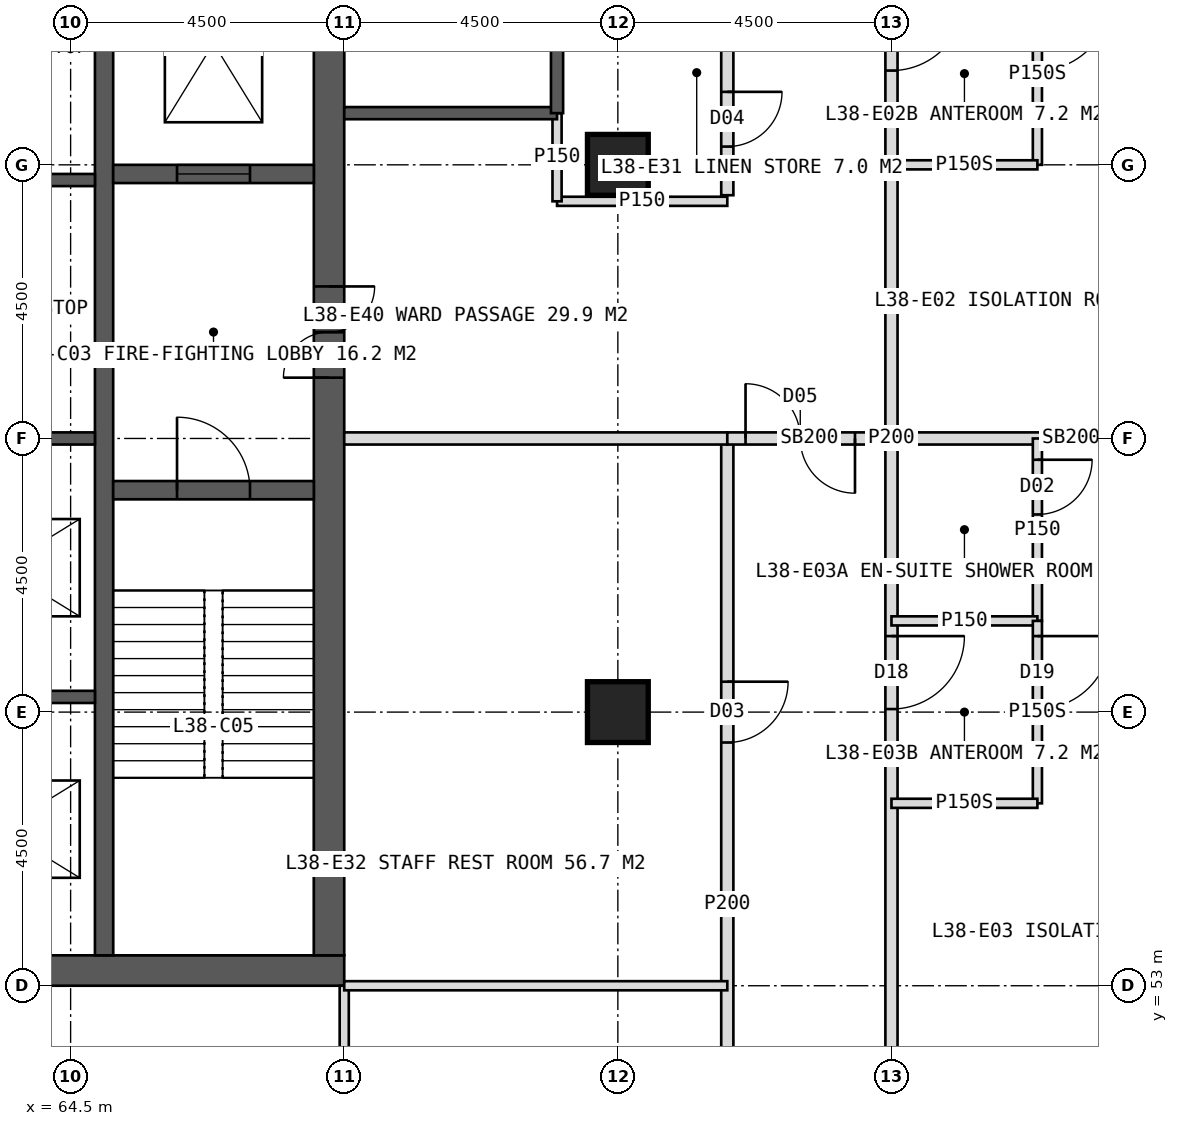
"""IFC4 building model, lengths in metres.
Left out: names, types, materials, properties, quantities, classifications, styles, units other than length and angle.
Written with IfcOpenShell. Run it as: python <this file> out.ifc"""

import sys

from ifc_helpers import new_model, si_unit, direction, frame, frame_2d, origin, origin_2d, place, context, subcontext, project, spatial, rectangle, hollow_rectangle, extrude, element, fill, save


model = new_model("IFC4")
c1 = context("Model", 3, precision=1e-05, world=origin(), true_north=direction((0.0, 1.0)))
c2 = subcontext(c1, "Body", "Model", "MODEL_VIEW")
j1 = project(units=[si_unit("LENGTHUNIT", "METRE"), si_unit("PLANEANGLEUNIT", "RADIAN")], contexts=[c1])
p1 = place(None, origin())
s1 = spatial("IfcSite", under=j1, at=p1, CompositionType="ELEMENT")
p2 = place(p1, origin())
s2 = spatial("IfcBuilding", under=s1, at=p2, CompositionType="ELEMENT")
p3 = place(p2, frame((0.0, 0.0, 160.0)))
s3 = spatial("IfcBuildingStorey", under=s2, at=p3, CompositionType="ELEMENT", Elevation=160.0)
p4 = place(p3, frame((51.0, 53.25, 0.0), z_axis=(0.0, 0.0, 1.0), x_axis=(1.0, 0.0, 0.0)))
e1 = element("IfcWall", 1, at=p4, inside=s3, PredefinedType="SHEAR", context=c2, shape_type="SweptSolid", body=[
    extrude(rectangle(XDim=18.0, YDim=0.5, at=frame_2d((9.0, 0.0))), origin(), (0.0, 0.0, 1.0), 4.0),
])
p5 = place(p4, frame((8.1, 0.0, 0.0)))
e2 = element("IfcOpeningElement", 2, at=p5, cuts=e1, PredefinedType="OPENING", context=c2, shape_type="SweptSolid", body=[
    extrude(rectangle(XDim=1.8, YDim=2.2, at=frame_2d((0.9, 1.1))), frame((0.0, 0.26, 0.0), z_axis=(0.0, -1.0, 0.0), x_axis=(1.0, 0.0, 0.0)), (0.0, 0.0, 1.0), 0.52),
])
p6 = place(p3, frame((68.75, 53.5, 0.0), z_axis=(0.0, 0.0, 1.0), x_axis=(0.0, 1.0, 0.0)))
e3 = element("IfcWall", 3, at=p6, inside=s3, PredefinedType="SHEAR", context=c2, shape_type="SweptSolid", body=[
    extrude(rectangle(XDim=17.0, YDim=0.5, at=frame_2d((8.5, 0.0))), origin(), (0.0, 0.0, 1.0), 4.0),
])
p7 = place(p6, frame((9.5, 0.0, 0.0)))
e4 = element("IfcOpeningElement", 4, at=p7, cuts=e3, PredefinedType="OPENING", context=c2, shape_type="SweptSolid", body=[
    extrude(rectangle(XDim=1.5, YDim=2.2, at=frame_2d((0.75, 1.1))), frame((0.0, 0.26, 0.0), z_axis=(0.0, -1.0, 0.0), x_axis=(1.0, 0.0, 0.0)), (0.0, 0.0, 1.0), 0.52),
])
p8 = place(p3, frame((65.05, 53.5, 0.0), z_axis=(0.0, 0.0, 1.0), x_axis=(0.0, 1.0, 0.0)))
e5 = element("IfcWall", 5, at=p8, inside=s3, PredefinedType="SHEAR", context=c2, shape_type="SweptSolid", body=[
    extrude(rectangle(XDim=17.0, YDim=0.3, at=frame_2d((8.5, 0.0))), origin(), (0.0, 0.0, 1.0), 4.0),
])
for number, where, z_axis, x_axis in (
    (6, (61.85, 57.75, 0.0), (0.0, 0.0, 1.0), (1.0, 0.0, 0.0)),
    (7, (61.85, 62.0, 0.0), (0.0, 0.0, 1.0), (1.0, 0.0, 0.0)),
    (8, (61.85, 66.25, 0.0), (0.0, 0.0, 1.0), (1.0, 0.0, 0.0)),
):
    element("IfcWall", number, at=place(p3, frame(where, z_axis=z_axis, x_axis=x_axis)), inside=s3, PredefinedType="SHEAR", context=c2, shape_type="SweptSolid", body=[
        extrude(rectangle(XDim=3.05, YDim=0.2, at=frame_2d((1.525, 0.0))), origin(), (0.0, 0.0, 1.0), 4.0),
    ])
p9 = place(p3, frame((65.2, 61.15, 0.0), z_axis=(0.0, 0.0, 1.0), x_axis=(1.0, 0.0, 0.0)))
e9 = element("IfcWall", 9, at=p9, inside=s3, PredefinedType="SHEAR", context=c2, shape_type="SweptSolid", body=[
    extrude(rectangle(XDim=3.3, YDim=0.3, at=frame_2d((1.65, 0.0))), origin(), (0.0, 0.0, 1.0), 4.0),
])
p10 = place(p9, frame((1.05, 0.0, 0.0)))
e10 = element("IfcOpeningElement", 10, at=p10, cuts=e9, PredefinedType="OPENING", context=c2, shape_type="SweptSolid", body=[
    extrude(rectangle(XDim=1.2, YDim=2.1, at=frame_2d((0.6, 1.05))), frame((0.0, 0.16, 0.0), z_axis=(0.0, -1.0, 0.0), x_axis=(1.0, 0.0, 0.0)), (0.0, 0.0, 1.0), 0.32),
])
p11 = place(p3, frame((65.2, 66.35, 0.0), z_axis=(0.0, 0.0, 1.0), x_axis=(1.0, 0.0, 0.0)))
e11 = element("IfcWall", 11, at=p11, inside=s3, PredefinedType="SHEAR", context=c2, shape_type="SweptSolid", body=[
    extrude(rectangle(XDim=3.3, YDim=0.3, at=frame_2d((1.65, 0.0))), origin(), (0.0, 0.0, 1.0), 4.0),
])
p12 = place(p11, frame((1.05, 0.0, 0.0)))
e12 = element("IfcOpeningElement", 12, at=p12, cuts=e11, PredefinedType="OPENING", context=c2, shape_type="SweptSolid", body=[
    extrude(rectangle(XDim=1.2, YDim=2.2, at=frame_2d((0.6, 1.1))), frame((0.0, 0.16, 0.0), z_axis=(0.0, -1.0, 0.0), x_axis=(1.0, 0.0, 0.0)), (0.0, 0.0, 1.0), 0.32),
])
for number, where, z_axis, x_axis in (
    (13, (73.5, 57.5, 0.0), (0.0, 0.0, 1.0), (1.0, 0.0, 0.0)),
    (14, (73.5, 66.5, 0.0), (0.0, 0.0, 1.0), (1.0, 0.0, 0.0)),
):
    element("IfcColumn", number, at=place(p3, frame(where, z_axis=z_axis, x_axis=x_axis)), inside=s3, PredefinedType="COLUMN", context=c2, shape_type="SweptSolid", body=[
        extrude(hollow_rectangle(XDim=1.0, YDim=1.0, WallThickness=0.1, at=origin_2d()), origin(), (0.0, 0.0, 1.0), 4.0),
    ])
p13 = place(p3, frame((69.0, 53.0, 0.0), z_axis=(0.0, 0.0, 1.0), x_axis=(0.0, -1.0, 0.0)))
e15 = element("IfcWall", 15, at=p13, inside=s3, PredefinedType="PARTITIONING", context=c2, shape_type="SweptSolid", body=[
    extrude(rectangle(XDim=6.3, YDim=0.15, at=frame_2d((3.15, 0.0))), origin(), (0.0, 0.0, 1.0), 3.75),
])
p14 = place(p3, frame((78.0, 62.0, 0.0), z_axis=(0.0, 0.0, 1.0), x_axis=(1.0, 0.0, 0.0)))
e16 = element("IfcWall", 16, at=p14, inside=s3, PredefinedType="SOLIDWALL", context=c2, shape_type="SweptSolid", body=[
    extrude(rectangle(XDim=5.91, YDim=0.2, at=frame_2d((2.955, 0.0))), origin(), (0.0, 0.0, 1.0), 2.95),
])
p15 = place(p3, frame((78.0, 80.0, 0.0), z_axis=(0.0, 0.0, 1.0), x_axis=(0.0, -1.0, 0.0)))
e17 = element("IfcWall", 17, at=p15, inside=s3, PredefinedType="PARTITIONING", context=c2, shape_type="SweptSolid", body=[
    extrude(rectangle(XDim=36.0, YDim=0.2, at=frame_2d((18.0, 0.0))), origin(), (0.0, 0.0, 1.0), 3.75),
])
p16 = place(p15, frame((3.25, 0.0, 0.0)))
e18 = element("IfcOpeningElement", 18, at=p16, cuts=e17, PredefinedType="OPENING", context=c2, shape_type="SweptSolid", body=[
    extrude(rectangle(XDim=1.2, YDim=2.2, at=frame_2d((0.6, 1.1))), frame((0.0, 0.11, 0.0), z_axis=(0.0, -1.0, 0.0), x_axis=(1.0, 0.0, 0.0)), (0.0, 0.0, 1.0), 0.22),
])
p17 = place(p15, frame((10.75, 0.0, 0.0)))
e19 = element("IfcOpeningElement", 19, at=p17, cuts=e17, PredefinedType="OPENING", context=c2, shape_type="SweptSolid", body=[
    extrude(rectangle(XDim=1.2, YDim=2.2, at=frame_2d((0.6, 1.1))), frame((0.0, 0.11, 0.0), z_axis=(0.0, -1.0, 0.0), x_axis=(1.0, 0.0, 0.0)), (0.0, 0.0, 1.0), 0.22),
])
p18 = place(p15, frame((21.25, 0.0, 0.0)))
e20 = element("IfcOpeningElement", 20, at=p18, cuts=e17, PredefinedType="OPENING", context=c2, shape_type="SweptSolid", body=[
    extrude(rectangle(XDim=1.2, YDim=2.2, at=frame_2d((0.6, 1.1))), frame((0.0, 0.11, 0.0), z_axis=(0.0, -1.0, 0.0), x_axis=(1.0, 0.0, 0.0)), (0.0, 0.0, 1.0), 0.22),
])
p19 = place(p15, frame((31.75, 0.0, 0.0)))
e21 = element("IfcOpeningElement", 21, at=p19, cuts=e17, PredefinedType="OPENING", context=c2, shape_type="SweptSolid", body=[
    extrude(rectangle(XDim=1.2, YDim=2.2, at=frame_2d((0.6, 1.1))), frame((0.0, 0.11, 0.0), z_axis=(0.0, -1.0, 0.0), x_axis=(1.0, 0.0, 0.0)), (0.0, 0.0, 1.0), 0.22),
])
p20 = place(p3, frame((80.4, 69.5, 0.0), z_axis=(0.0, 0.0, 1.0), x_axis=(0.0, -1.0, 0.0)))
e22 = element("IfcWall", 22, at=p20, inside=s3, PredefinedType="PARTITIONING", context=c2, shape_type="SweptSolid", body=[
    extrude(rectangle(XDim=3.0, YDim=0.15, at=frame_2d((1.5, 0.0))), origin(), (0.0, 0.0, 1.0), 3.75),
])
p21 = place(p20, frame((0.25, 0.0, 0.0)))
e23 = element("IfcOpeningElement", 23, at=p21, cuts=e22, PredefinedType="OPENING", context=c2, shape_type="SweptSolid", body=[
    extrude(rectangle(XDim=1.2, YDim=2.2, at=frame_2d((0.6, 1.1))), frame((0.0, 0.085, 0.0), z_axis=(0.0, -1.0, 0.0), x_axis=(1.0, 0.0, 0.0)), (0.0, 0.0, 1.0), 0.17),
])
p22 = place(p3, frame((78.0, 66.5, 0.0), z_axis=(0.0, 0.0, 1.0), x_axis=(1.0, 0.0, 0.0)))
e24 = element("IfcWall", 24, at=p22, inside=s3, PredefinedType="PARTITIONING", context=c2, shape_type="SweptSolid", body=[
    extrude(rectangle(XDim=2.4, YDim=0.15, at=frame_2d((1.2, 0.0))), origin(), (0.0, 0.0, 1.0), 2.95),
])
p23 = place(p3, frame((80.4, 62.0, 0.0), z_axis=(0.0, 0.0, 1.0), x_axis=(0.0, -1.0, 0.0)))
e25 = element("IfcWall", 25, at=p23, inside=s3, PredefinedType="PARTITIONING", context=c2, shape_type="SweptSolid", body=[
    extrude(rectangle(XDim=3.0, YDim=0.15, at=frame_2d((1.5, 0.0))), origin(), (0.0, 0.0, 1.0), 3.75),
])
p24 = place(p23, frame((0.35, 0.0, 0.0)))
e26 = element("IfcOpeningElement", 26, at=p24, cuts=e25, PredefinedType="OPENING", context=c2, shape_type="SweptSolid", body=[
    extrude(rectangle(XDim=0.9, YDim=2.1, at=frame_2d((0.45, 1.05))), frame((0.0, 0.085, 0.0), z_axis=(0.0, -1.0, 0.0), x_axis=(1.0, 0.0, 0.0)), (0.0, 0.0, 1.0), 0.17),
])
p25 = place(p3, frame((78.0, 59.0, 0.0), z_axis=(0.0, 0.0, 1.0), x_axis=(1.0, 0.0, 0.0)))
e27 = element("IfcWall", 27, at=p25, inside=s3, PredefinedType="PARTITIONING", context=c2, shape_type="SweptSolid", body=[
    extrude(rectangle(XDim=2.4, YDim=0.15, at=frame_2d((1.2, 0.0))), origin(), (0.0, 0.0, 1.0), 3.75),
])
p26 = place(p3, frame((80.4, 59.0, 0.0), z_axis=(0.0, 0.0, 1.0), x_axis=(0.0, -1.0, 0.0)))
e28 = element("IfcWall", 28, at=p26, inside=s3, PredefinedType="PARTITIONING", context=c2, shape_type="SweptSolid", body=[
    extrude(rectangle(XDim=3.0, YDim=0.15, at=frame_2d((1.5, 0.0))), origin(), (0.0, 0.0, 1.0), 3.75),
])
p27 = place(p26, frame((0.25, 0.0, 0.0)))
e29 = element("IfcOpeningElement", 29, at=p27, cuts=e28, PredefinedType="OPENING", context=c2, shape_type="SweptSolid", body=[
    extrude(rectangle(XDim=1.2, YDim=2.2, at=frame_2d((0.6, 1.1))), frame((0.0, 0.085, 0.0), z_axis=(0.0, -1.0, 0.0), x_axis=(1.0, 0.0, 0.0)), (0.0, 0.0, 1.0), 0.17),
])
p28 = place(p3, frame((78.0, 56.0, 0.0), z_axis=(0.0, 0.0, 1.0), x_axis=(1.0, 0.0, 0.0)))
e30 = element("IfcWall", 30, at=p28, inside=s3, PredefinedType="PARTITIONING", context=c2, shape_type="SweptSolid", body=[
    extrude(rectangle(XDim=2.4, YDim=0.15, at=frame_2d((1.2, 0.0))), origin(), (0.0, 0.0, 1.0), 3.75),
])
p29 = place(p3, frame((75.3, 77.3, 0.0), z_axis=(0.0, 0.0, 1.0), x_axis=(0.0, -1.0, 0.0)))
e31 = element("IfcWall", 31, at=p29, inside=s3, PredefinedType="PARTITIONING", context=c2, shape_type="SweptSolid", body=[
    extrude(rectangle(XDim=11.3, YDim=0.2, at=frame_2d((5.65, 0.0))), origin(), (0.0, 0.0, 1.0), 3.75),
])
p30 = place(p29, frame((7.1, 0.0, 0.0)))
e32 = element("IfcOpeningElement", 32, at=p30, cuts=e31, PredefinedType="OPENING", context=c2, shape_type="SweptSolid", body=[
    extrude(rectangle(XDim=0.9, YDim=2.1, at=frame_2d((0.45, 1.05))), frame((0.0, 0.11, 0.0), z_axis=(0.0, -1.0, 0.0), x_axis=(1.0, 0.0, 0.0)), (0.0, 0.0, 1.0), 0.22),
])
p31 = place(p29, frame((9.6, 0.0, 0.0)))
e33 = element("IfcOpeningElement", 33, at=p31, cuts=e31, PredefinedType="OPENING", context=c2, shape_type="SweptSolid", body=[
    extrude(rectangle(XDim=0.9, YDim=2.1, at=frame_2d((0.45, 1.05))), frame((0.0, 0.11, 0.0), z_axis=(0.0, -1.0, 0.0), x_axis=(1.0, 0.0, 0.0)), (0.0, 0.0, 1.0), 0.22),
])
p32 = place(p3, frame((75.3, 62.0, 0.0), z_axis=(0.0, 0.0, 1.0), x_axis=(0.0, -1.0, 0.0)))
e34 = element("IfcWall", 34, at=p32, inside=s3, PredefinedType="PARTITIONING", context=c2, shape_type="SweptSolid", body=[
    extrude(rectangle(XDim=15.3, YDim=0.2, at=frame_2d((7.65, 0.0))), origin(), (0.0, 0.0, 1.0), 3.75),
])
p33 = place(p32, frame((4.0, 0.0, 0.0)))
e35 = element("IfcOpeningElement", 35, at=p33, cuts=e34, PredefinedType="OPENING", context=c2, shape_type="SweptSolid", body=[
    extrude(rectangle(XDim=1.0, YDim=2.1, at=frame_2d((0.5, 1.05))), frame((0.0, 0.11, 0.0), z_axis=(0.0, -1.0, 0.0), x_axis=(1.0, 0.0, 0.0)), (0.0, 0.0, 1.0), 0.22),
])
p34 = place(p32, frame((11.65, 0.0, 0.0)))
e36 = element("IfcOpeningElement", 36, at=p34, cuts=e34, PredefinedType="OPENING", context=c2, shape_type="SweptSolid", body=[
    extrude(rectangle(XDim=1.0, YDim=2.1, at=frame_2d((0.5, 1.05))), frame((0.0, 0.11, 0.0), z_axis=(0.0, -1.0, 0.0), x_axis=(1.0, 0.0, 0.0)), (0.0, 0.0, 1.0), 0.22),
])
p35 = place(p3, frame((72.5, 65.9, 0.0), z_axis=(0.0, 0.0, 1.0), x_axis=(1.0, 0.0, 0.0)))
e37 = element("IfcWall", 37, at=p35, inside=s3, PredefinedType="PARTITIONING", context=c2, shape_type="SweptSolid", body=[
    extrude(rectangle(XDim=2.8, YDim=0.15, at=frame_2d((1.4, 0.0))), origin(), (0.0, 0.0, 1.0), 3.75),
])
p36 = place(p3, frame((69.0, 62.0, 0.0), z_axis=(0.0, 0.0, 1.0), x_axis=(1.0, 0.0, 0.0)))
e38 = element("IfcWall", 38, at=p36, inside=s3, PredefinedType="SOLIDWALL", context=c2, shape_type="SweptSolid", body=[
    extrude(rectangle(XDim=6.3, YDim=0.2, at=frame_2d((3.15, 0.0))), origin(), (0.0, 0.0, 1.0), 2.95),
])
p37 = place(p3, frame((69.0, 53.0, 0.0), z_axis=(0.0, 0.0, 1.0), x_axis=(1.0, 0.0, 0.0)))
e39 = element("IfcWall", 39, at=p37, inside=s3, PredefinedType="PARTITIONING", context=c2, shape_type="SweptSolid", body=[
    extrude(rectangle(XDim=6.3, YDim=0.15, at=frame_2d((3.15, 0.0))), origin(), (0.0, 0.0, 1.0), 3.75),
])
p38 = place(p3, frame((75.3, 62.0, 0.0), z_axis=(0.0, 0.0, 1.0), x_axis=(1.0, 0.0, 0.0)))
e40 = element("IfcWall", 40, at=p38, inside=s3, PredefinedType="SOLIDWALL", context=c2, shape_type="SweptSolid", body=[
    extrude(rectangle(XDim=2.7, YDim=0.2, at=frame_2d((1.35, 0.0))), origin(), (0.0, 0.0, 1.0), 2.95),
])
p39 = place(p38, frame((0.3, 0.0, 0.0)))
e41 = element("IfcOpeningElement", 41, at=p39, cuts=e40, PredefinedType="OPENING", context=c2, shape_type="SweptSolid", body=[
    extrude(rectangle(XDim=1.8, YDim=2.2, at=frame_2d((0.9, 1.1))), frame((0.0, 0.11, 0.0), z_axis=(0.0, -1.0, 0.0), x_axis=(1.0, 0.0, 0.0)), (0.0, 0.0, 1.0), 0.22),
])
p40 = place(p3, frame((72.5, 65.9, 0.0), z_axis=(0.0, 0.0, 1.0), x_axis=(0.0, 1.0, 0.0)))
e42 = element("IfcWall", 42, at=p40, inside=s3, PredefinedType="PARTITIONING", context=c2, shape_type="SweptSolid", body=[
    extrude(rectangle(XDim=1.45, YDim=0.15, at=frame_2d((0.725, 0.0))), origin(), (0.0, 0.0, 1.0), 3.75),
])
p41 = place(p3, frame((69.0, 67.35, 0.0), z_axis=(0.0, 0.0, 1.0), x_axis=(1.0, 0.0, 0.0)))
e43 = element("IfcWall", 43, at=p41, inside=s3, PredefinedType="SOLIDWALL", context=c2, shape_type="SweptSolid", body=[
    extrude(rectangle(XDim=3.5, YDim=0.2, at=frame_2d((1.75, 0.0))), origin(), (0.0, 0.0, 1.0), 3.75),
])
p42 = place(p3, frame((72.5, 67.35, 0.0), z_axis=(0.0, 0.0, 1.0), x_axis=(0.0, 1.0, 0.0)))
e44 = element("IfcWall", 44, at=p42, inside=s3, PredefinedType="SOLIDWALL", context=c2, shape_type="SweptSolid", body=[
    extrude(rectangle(XDim=7.75, YDim=0.2, at=frame_2d((3.875, 0.0))), origin(), (0.0, 0.0, 1.0), 3.75),
])
p43 = place(p21, origin())
e45 = element("IfcDoor", 45, at=p43, inside=s3, OperationType="SINGLE_SWING_LEFT", PredefinedType="DOOR", context=c2, shape_type="SweptSolid", body=[
    extrude(rectangle(XDim=1.2, YDim=2.2, at=frame_2d((0.6, 1.1))), frame((0.0, 0.025, 0.0), z_axis=(0.0, -1.0, 0.0), x_axis=(1.0, 0.0, 0.0)), (0.0, 0.0, 1.0), 0.05),
])
fill(e23, e45)
p44 = place(p17, origin())
e46 = element("IfcDoor", 46, at=p44, inside=s3, OperationType="SINGLE_SWING_LEFT", PredefinedType="DOOR", context=c2, shape_type="SweptSolid", body=[
    extrude(rectangle(XDim=1.2, YDim=2.2, at=frame_2d((0.6, 1.1))), frame((0.0, 0.025, 0.0), z_axis=(0.0, -1.0, 0.0), x_axis=(1.0, 0.0, 0.0)), (0.0, 0.0, 1.0), 0.05),
])
fill(e19, e46)
p45 = place(p27, origin())
e47 = element("IfcDoor", 47, at=p45, inside=s3, OperationType="SINGLE_SWING_LEFT", PredefinedType="DOOR", context=c2, shape_type="SweptSolid", body=[
    extrude(rectangle(XDim=1.2, YDim=2.2, at=frame_2d((0.6, 1.1))), frame((0.0, 0.025, 0.0), z_axis=(0.0, -1.0, 0.0), x_axis=(1.0, 0.0, 0.0)), (0.0, 0.0, 1.0), 0.05),
])
fill(e29, e47)
p46 = place(p18, origin())
e48 = element("IfcDoor", 48, at=p46, inside=s3, OperationType="SINGLE_SWING_LEFT", PredefinedType="DOOR", context=c2, shape_type="SweptSolid", body=[
    extrude(rectangle(XDim=1.2, YDim=2.2, at=frame_2d((0.6, 1.1))), frame((0.0, 0.025, 0.0), z_axis=(0.0, -1.0, 0.0), x_axis=(1.0, 0.0, 0.0)), (0.0, 0.0, 1.0), 0.05),
])
fill(e20, e48)
p47 = place(p24, origin())
e49 = element("IfcDoor", 49, at=p47, inside=s3, OperationType="SINGLE_SWING_LEFT", PredefinedType="DOOR", context=c2, shape_type="SweptSolid", body=[
    extrude(rectangle(XDim=0.9, YDim=2.1, at=frame_2d((0.45, 1.05))), frame((0.0, 0.025, 0.0), z_axis=(0.0, -1.0, 0.0), x_axis=(1.0, 0.0, 0.0)), (0.0, 0.0, 1.0), 0.05),
])
fill(e26, e49)
p48 = place(p31, origin())
e50 = element("IfcDoor", 50, at=p48, inside=s3, OperationType="SINGLE_SWING_LEFT", PredefinedType="DOOR", context=c2, shape_type="SweptSolid", body=[
    extrude(rectangle(XDim=0.9, YDim=2.1, at=frame_2d((0.45, 1.05))), frame((0.0, 0.025, 0.0), z_axis=(0.0, -1.0, 0.0), x_axis=(1.0, 0.0, 0.0)), (0.0, 0.0, 1.0), 0.05),
])
fill(e33, e50)
p49 = place(p33, origin())
e51 = element("IfcDoor", 51, at=p49, inside=s3, OperationType="SINGLE_SWING_LEFT", PredefinedType="DOOR", context=c2, shape_type="SweptSolid", body=[
    extrude(rectangle(XDim=1.0, YDim=2.1, at=frame_2d((0.5, 1.05))), frame((0.0, 0.025, 0.0), z_axis=(0.0, -1.0, 0.0), x_axis=(1.0, 0.0, 0.0)), (0.0, 0.0, 1.0), 0.05),
])
fill(e35, e51)
p50 = place(p39, origin())
e52 = element("IfcDoor", 52, at=p50, inside=s3, OperationType="DOUBLE_DOOR_DOUBLE_SWING", PredefinedType="DOOR", context=c2, shape_type="SweptSolid", body=[
    extrude(rectangle(XDim=1.8, YDim=2.2, at=frame_2d((0.9, 1.1))), frame((0.0, 0.025, 0.0), z_axis=(0.0, -1.0, 0.0), x_axis=(1.0, 0.0, 0.0)), (0.0, 0.0, 1.0), 0.05),
])
fill(e41, e52)
p51 = place(p7, origin())
e53 = element("IfcDoor", 53, at=p51, inside=s3, OperationType="DOUBLE_DOOR_SINGLE_SWING", PredefinedType="DOOR", context=c2, shape_type="SweptSolid", body=[
    extrude(rectangle(XDim=1.5, YDim=2.2, at=frame_2d((0.75, 1.1))), frame((0.0, 0.025, 0.0), z_axis=(0.0, -1.0, 0.0), x_axis=(1.0, 0.0, 0.0)), (0.0, 0.0, 1.0), 0.05),
])
fill(e4, e53)
p52 = place(p10, origin())
e54 = element("IfcDoor", 54, at=p52, inside=s3, OperationType="SINGLE_SWING_LEFT", PredefinedType="DOOR", context=c2, shape_type="SweptSolid", body=[
    extrude(rectangle(XDim=1.2, YDim=2.1, at=frame_2d((0.6, 1.05))), frame((0.0, 0.025, 0.0), z_axis=(0.0, -1.0, 0.0), x_axis=(1.0, 0.0, 0.0)), (0.0, 0.0, 1.0), 0.05),
])
fill(e10, e54)
p53 = place(p12, origin())
e55 = element("IfcDoor", 55, at=p53, inside=s3, OperationType="SLIDING_TO_LEFT", PredefinedType="DOOR", context=c2, shape_type="SweptSolid", body=[
    extrude(rectangle(XDim=1.2, YDim=2.2, at=frame_2d((0.6, 1.1))), frame((0.0, 0.025, 0.0), z_axis=(0.0, -1.0, 0.0), x_axis=(1.0, 0.0, 0.0)), (0.0, 0.0, 1.0), 0.05),
])
fill(e12, e55)
save(model, sys.argv[1])
